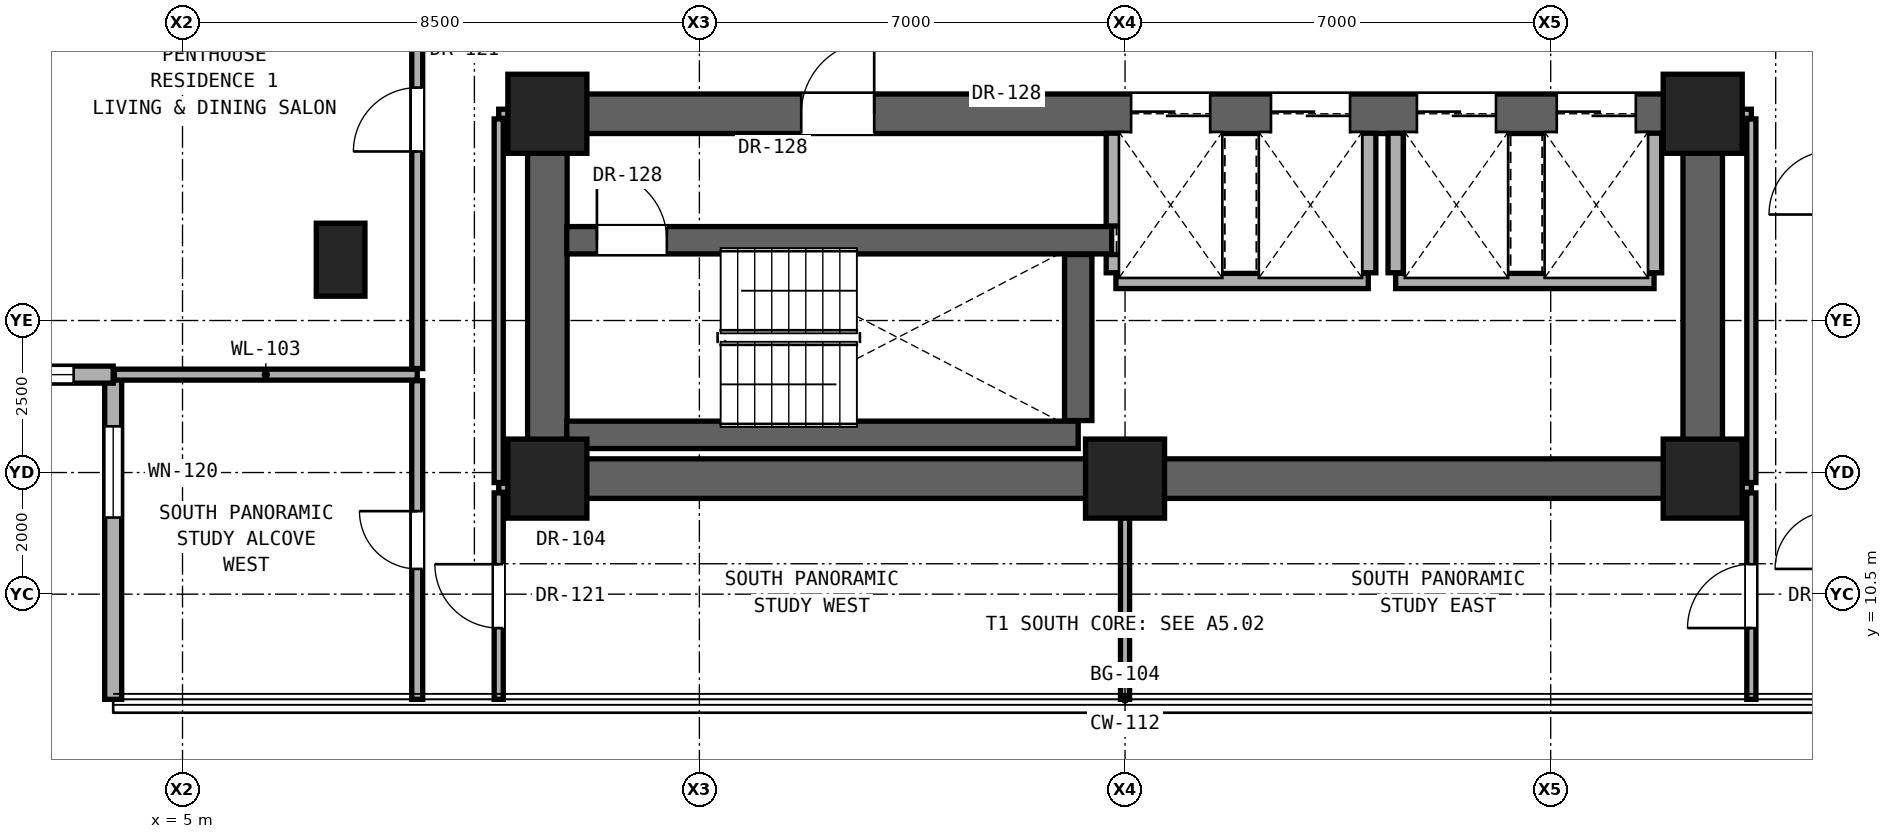
"""IFC4 building model, lengths in metres.
Left out: names, types, materials, properties, quantities, classifications, styles, units other than length and angle.
Written with IfcOpenShell. Run it as: python <this file> out.ifc"""

import sys

from ifc_helpers import new_model, si_unit, direction, frame, frame_2d, origin, origin_2d, place, context, subcontext, project, spatial, rectangle, extrude, element, fill, save


model = new_model("IFC4")
c1 = context("Model", 3, precision=1e-05, world=origin(), true_north=direction((0.0, 1.0)))
c2 = subcontext(c1, "Body", "Model", "MODEL_VIEW")
j1 = project(units=[si_unit("LENGTHUNIT", "METRE"), si_unit("PLANEANGLEUNIT", "RADIAN")], contexts=[c1])
p1 = place(None, origin())
s1 = spatial("IfcSite", under=j1, at=p1, CompositionType="ELEMENT")
p2 = place(p1, origin())
s2 = spatial("IfcBuilding", under=s1, at=p2, CompositionType="ELEMENT")
p3 = place(p2, frame((0.0, 0.0, 68.6)))
s3 = spatial("IfcBuildingStorey", under=s2, at=p3, CompositionType="ELEMENT", Elevation=68.6)
for number, where, z_axis, x_axis in (
    (1, (11.0, 12.4, 0.0), (0.0, 0.0, 1.0), (1.0, 0.0, 0.0)),
    (2, (20.5, 12.4, 0.0), (0.0, 0.0, 1.0), (1.0, 0.0, 0.0)),
    (3, (30.0, 12.4, 0.0), (0.0, 0.0, 1.0), (1.0, 0.0, 0.0)),
    (4, (11.0, 18.4, 0.0), (0.0, 0.0, 1.0), (1.0, 0.0, 0.0)),
    (5, (30.0, 18.4, 0.0), (0.0, 0.0, 1.0), (1.0, 0.0, 0.0)),
):
    element("IfcColumn", number, at=place(p3, frame(where, z_axis=z_axis, x_axis=x_axis)), inside=s3, PredefinedType="COLUMN", context=c2, shape_type="SweptSolid", body=[
        extrude(rectangle(XDim=1.3, YDim=1.3, at=origin_2d()), origin(), (0.0, 0.0, 1.0), 3.3),
    ])
p4 = place(p3, frame((7.6, 16.0, 0.0), z_axis=(0.0, 0.0, 1.0), x_axis=(1.0, 0.0, 0.0)))
e6 = element("IfcColumn", 6, at=p4, inside=s3, PredefinedType="PILASTER", context=c2, shape_type="SweptSolid", body=[
    extrude(rectangle(XDim=0.8, YDim=1.2, at=origin_2d()), origin(), (0.0, 0.0, 1.0), 3.3),
])
p5 = place(p3, frame((11.0, 12.4, 0.0), z_axis=(0.0, 0.0, 1.0), x_axis=(1.0, 0.0, 0.0)))
e7 = element("IfcWall", 7, at=p5, inside=s3, PredefinedType="SHEAR", context=c2, shape_type="SweptSolid", body=[
    extrude(rectangle(XDim=19.0, YDim=0.65, at=frame_2d((9.5, 0.0))), origin(), (0.0, 0.0, 1.0), 3.06),
])
for number, where, z_axis, x_axis in (
    (8, (11.0, 12.4, 0.0), (0.0, 0.0, 1.0), (0.0, 1.0, 0.0)),
    (9, (30.0, 12.4, 0.0), (0.0, 0.0, 1.0), (0.0, 1.0, 0.0)),
):
    element("IfcWall", number, at=place(p3, frame(where, z_axis=z_axis, x_axis=x_axis)), inside=s3, PredefinedType="SHEAR", context=c2, shape_type="SweptSolid", body=[
        extrude(rectangle(XDim=6.0, YDim=0.65, at=frame_2d((3.0, 0.0))), origin(), (0.0, 0.0, 1.0), 3.06),
    ])
p6 = place(p3, frame((11.0, 18.4, 0.0), z_axis=(0.0, 0.0, 1.0), x_axis=(1.0, 0.0, 0.0)))
e10 = element("IfcWall", 10, at=p6, inside=s3, PredefinedType="SHEAR", context=c2, shape_type="SweptSolid", body=[
    extrude(rectangle(XDim=19.0, YDim=0.65, at=frame_2d((9.5, 0.0))), origin(), (0.0, 0.0, 1.0), 3.06),
])
p7 = place(p6, frame((4.175, 0.0, 0.0)))
e11 = element("IfcOpeningElement", 11, at=p7, cuts=e10, PredefinedType="OPENING", context=c2, shape_type="SweptSolid", body=[
    extrude(rectangle(XDim=1.2, YDim=2.25, at=frame_2d((0.6, 1.125))), frame((0.0, 0.335, 0.0), z_axis=(0.0, -1.0, 0.0), x_axis=(1.0, 0.0, 0.0)), (0.0, 0.0, 1.0), 0.67),
])
p8 = place(p6, frame((9.6, 0.0, 0.0)))
e12 = element("IfcOpeningElement", 12, at=p8, cuts=e10, PredefinedType="OPENING", context=c2, shape_type="SweptSolid", body=[
    extrude(rectangle(XDim=1.3, YDim=2.3, at=frame_2d((0.65, 1.15))), frame((0.0, 0.335, 0.0), z_axis=(0.0, -1.0, 0.0), x_axis=(1.0, 0.0, 0.0)), (0.0, 0.0, 1.0), 0.67),
])
p9 = place(p6, frame((11.9, 0.0, 0.0)))
e13 = element("IfcOpeningElement", 13, at=p9, cuts=e10, PredefinedType="OPENING", context=c2, shape_type="SweptSolid", body=[
    extrude(rectangle(XDim=1.3, YDim=2.3, at=frame_2d((0.65, 1.15))), frame((0.0, 0.335, 0.0), z_axis=(0.0, -1.0, 0.0), x_axis=(1.0, 0.0, 0.0)), (0.0, 0.0, 1.0), 0.67),
])
p10 = place(p6, frame((14.3, 0.0, 0.0)))
e14 = element("IfcOpeningElement", 14, at=p10, cuts=e10, PredefinedType="OPENING", context=c2, shape_type="SweptSolid", body=[
    extrude(rectangle(XDim=1.3, YDim=2.3, at=frame_2d((0.65, 1.15))), frame((0.0, 0.335, 0.0), z_axis=(0.0, -1.0, 0.0), x_axis=(1.0, 0.0, 0.0)), (0.0, 0.0, 1.0), 0.67),
])
p11 = place(p6, frame((16.6, 0.0, 0.0)))
e15 = element("IfcOpeningElement", 15, at=p11, cuts=e10, PredefinedType="OPENING", context=c2, shape_type="SweptSolid", body=[
    extrude(rectangle(XDim=1.3, YDim=2.3, at=frame_2d((0.65, 1.15))), frame((0.0, 0.335, 0.0), z_axis=(0.0, -1.0, 0.0), x_axis=(1.0, 0.0, 0.0)), (0.0, 0.0, 1.0), 0.67),
])
p12 = place(p3, frame((3.86, 14.11, 0.0), z_axis=(0.0, 0.0, 1.0), x_axis=(0.0, -1.0, 0.0)))
e16 = element("IfcWall", 16, at=p12, inside=s3, PredefinedType="SOLIDWALL", context=c2, shape_type="SweptSolid", body=[
    extrude(rectangle(XDim=5.34, YDim=0.28, at=frame_2d((2.67, 0.0))), origin(), (0.0, 0.0, 1.0), 3.04),
])
p13 = place(p12, frame((0.85, 0.0, 0.79)))
e17 = element("IfcOpeningElement", 17, at=p13, cuts=e16, PredefinedType="OPENING", context=c2, shape_type="SweptSolid", body=[
    extrude(rectangle(XDim=1.5, YDim=2.1, at=frame_2d((0.75, 1.05))), frame((0.0, 0.15, 0.0), z_axis=(0.0, -1.0, 0.0), x_axis=(1.0, 0.0, 0.0)), (0.0, 0.0, 1.0), 0.3),
])
p14 = place(p3, frame((-1.48, 14.11, 0.0), z_axis=(0.0, 0.0, 1.0), x_axis=(1.0, 0.0, 0.0)))
e18 = element("IfcWall", 18, at=p14, inside=s3, PredefinedType="SOLIDWALL", context=c2, shape_type="SweptSolid", body=[
    extrude(rectangle(XDim=5.34, YDim=0.28, at=frame_2d((2.67, 0.0))), origin(), (0.0, 0.0, 1.0), 3.04),
])
p15 = place(p14, frame((3.59, 0.0, 0.85)))
e19 = element("IfcOpeningElement", 19, at=p15, cuts=e18, PredefinedType="OPENING", context=c2, shape_type="SweptSolid", body=[
    extrude(rectangle(XDim=1.1, YDim=2.0, at=frame_2d((0.55, 1.0))), frame((0.0, 0.15, 0.0), z_axis=(0.0, -1.0, 0.0), x_axis=(1.0, 0.0, 0.0)), (0.0, 0.0, 1.0), 0.3),
])
for number, where, z_axis, x_axis in (
    (20, (10.2, 12.25, 0.0), (0.0, 0.0, 1.0), (1.0, 0.0, 0.0)),
    (21, (30.32, 12.25, 0.0), (0.0, 0.0, 1.0), (1.0, 0.0, 0.0)),
):
    element("IfcWall", number, at=place(p3, frame(where, z_axis=z_axis, x_axis=x_axis)), inside=s3, PredefinedType="PARTITIONING", context=c2, shape_type="SweptSolid", body=[
        extrude(rectangle(XDim=0.48, YDim=0.15, at=frame_2d((0.24, 0.0))), origin(), (0.0, 0.0, 1.0), 3.06),
    ])
p16 = place(p3, frame((11.32, 13.12, 0.0), z_axis=(0.0, 0.0, 1.0), x_axis=(1.0, 0.0, 0.0)))
e22 = element("IfcWall", 22, at=p16, inside=s3, PredefinedType="SHEAR", context=c2, shape_type="SweptSolid", body=[
    extrude(rectangle(XDim=8.41, YDim=0.45, at=frame_2d((4.205, 0.0))), origin(), (0.0, 0.0, 1.0), 3.06),
])
p17 = place(p3, frame((3.88, 14.11, 0.0), z_axis=(0.0, 0.0, 1.0), x_axis=(1.0, 0.0, 0.0)))
e23 = element("IfcWall", 23, at=p17, inside=s3, PredefinedType="PARTITIONING", context=c2, shape_type="SweptSolid", body=[
    extrude(rectangle(XDim=4.98, YDim=0.18, at=frame_2d((2.49, 0.0))), origin(), (0.0, 0.0, 1.0), 3.06),
])
p18 = place(p3, frame((20.35, 15.65, 0.0), z_axis=(0.0, 0.0, 1.0), x_axis=(1.0, 0.0, 0.0)))
e24 = element("IfcWall", 24, at=p18, inside=s3, PredefinedType="SOLIDWALL", context=c2, shape_type="SweptSolid", body=[
    extrude(rectangle(XDim=4.15, YDim=0.25, at=frame_2d((2.075, 0.0))), origin(), (0.0, 0.0, 1.0), 3.06),
])
p19 = place(p3, frame((24.95, 15.65, 0.0), z_axis=(0.0, 0.0, 1.0), x_axis=(1.0, 0.0, 0.0)))
e25 = element("IfcWall", 25, at=p19, inside=s3, PredefinedType="SOLIDWALL", context=c2, shape_type="SweptSolid", body=[
    extrude(rectangle(XDim=4.25, YDim=0.25, at=frame_2d((2.125, 0.0))), origin(), (0.0, 0.0, 1.0), 3.06),
])
p20 = place(p3, frame((11.32, 16.32, 0.0), z_axis=(0.0, 0.0, 1.0), x_axis=(1.0, 0.0, 0.0)))
e26 = element("IfcWall", 26, at=p20, inside=s3, PredefinedType="SHEAR", context=c2, shape_type="SweptSolid", body=[
    extrude(rectangle(XDim=8.96, YDim=0.45, at=frame_2d((4.48, 0.0))), origin(), (0.0, 0.0, 1.0), 3.06),
])
p21 = place(p20, frame((0.495, 0.0, 0.0)))
e27 = element("IfcOpeningElement", 27, at=p21, cuts=e26, PredefinedType="OPENING", context=c2, shape_type="SweptSolid", body=[
    extrude(rectangle(XDim=1.15, YDim=2.2, at=frame_2d((0.575, 1.1))), frame((0.0, 0.235, 0.0), z_axis=(0.0, -1.0, 0.0), x_axis=(1.0, 0.0, 0.0)), (0.0, 0.0, 1.0), 0.47),
])
for number, where, z_axis, x_axis in (
    (28, (10.2, 18.4, 0.0), (0.0, 0.0, 1.0), (1.0, 0.0, 0.0)),
    (29, (30.32, 18.4, 0.0), (0.0, 0.0, 1.0), (1.0, 0.0, 0.0)),
):
    element("IfcWall", number, at=place(p3, frame(where, z_axis=z_axis, x_axis=x_axis)), inside=s3, PredefinedType="PARTITIONING", context=c2, shape_type="SweptSolid", body=[
        extrude(rectangle(XDim=0.48, YDim=0.15, at=frame_2d((0.24, 0.0))), origin(), (0.0, 0.0, 1.0), 2.436),
    ])
p22 = place(p3, frame((8.86, 8.77, 0.0), z_axis=(0.0, 0.0, 1.0), x_axis=(0.0, 1.0, 0.0)))
e30 = element("IfcWall", 30, at=p22, inside=s3, PredefinedType="PARTITIONING", context=c2, shape_type="SweptSolid", body=[
    extrude(rectangle(XDim=5.24, YDim=0.18, at=frame_2d((2.62, 0.0))), origin(), (0.0, 0.0, 1.0), 3.06),
])
p23 = place(p22, frame((2.145, 0.0, 0.0)))
e31 = element("IfcOpeningElement", 31, at=p23, cuts=e30, PredefinedType="OPENING", context=c2, shape_type="SweptSolid", body=[
    extrude(rectangle(XDim=0.95, YDim=2.15, at=frame_2d((0.475, 1.075))), frame((0.0, 0.1, 0.0), z_axis=(0.0, -1.0, 0.0), x_axis=(1.0, 0.0, 0.0)), (0.0, 0.0, 1.0), 0.2),
])
p24 = place(p3, frame((8.86, 14.21, 0.0), z_axis=(0.0, 0.0, 1.0), x_axis=(0.0, 1.0, 0.0)))
e32 = element("IfcWall", 32, at=p24, inside=s3, PredefinedType="PARTITIONING", context=c2, shape_type="SweptSolid", body=[
    extrude(rectangle(XDim=8.19, YDim=0.18, at=frame_2d((4.095, 0.0))), origin(), (0.0, 0.0, 1.0), 2.436),
])
p25 = place(p24, frame((3.57, 0.0, 0.0)))
e33 = element("IfcOpeningElement", 33, at=p25, cuts=e32, PredefinedType="OPENING", context=c2, shape_type="SweptSolid", body=[
    extrude(rectangle(XDim=1.05, YDim=2.2, at=frame_2d((0.525, 1.1))), frame((0.0, 0.1, 0.0), z_axis=(0.0, -1.0, 0.0), x_axis=(1.0, 0.0, 0.0)), (0.0, 0.0, 1.0), 0.2),
])
p26 = place(p3, frame((10.2, 8.77, 0.0), z_axis=(0.0, 0.0, 1.0), x_axis=(0.0, 1.0, 0.0)))
e34 = element("IfcWall", 34, at=p26, inside=s3, PredefinedType="PARTITIONING", context=c2, shape_type="SweptSolid", body=[
    extrude(rectangle(XDim=3.395, YDim=0.15, at=frame_2d((1.698, 0.0))), origin(), (0.0, 0.0, 1.0), 3.06),
])
p27 = place(p26, frame((1.173, 0.0, 0.0)))
e35 = element("IfcOpeningElement", 35, at=p27, cuts=e34, PredefinedType="OPENING", context=c2, shape_type="SweptSolid", body=[
    extrude(rectangle(XDim=1.05, YDim=2.2, at=frame_2d((0.525, 1.1))), frame((0.0, 0.085, 0.0), z_axis=(0.0, -1.0, 0.0), x_axis=(1.0, 0.0, 0.0)), (0.0, 0.0, 1.0), 0.17),
])
p28 = place(p3, frame((10.2, 12.335, 0.0), z_axis=(0.0, 0.0, 1.0), x_axis=(0.0, 1.0, 0.0)))
e36 = element("IfcWall", 36, at=p28, inside=s3, PredefinedType="PARTITIONING", context=c2, shape_type="SweptSolid", body=[
    extrude(rectangle(XDim=5.98, YDim=0.15, at=frame_2d((2.99, 0.0))), origin(), (0.0, 0.0, 1.0), 2.436),
])
p29 = place(p3, frame((19.73, 13.355, 0.0), z_axis=(0.0, 0.0, 1.0), x_axis=(0.0, 1.0, 0.0)))
e37 = element("IfcWall", 37, at=p29, inside=s3, PredefinedType="SHEAR", context=c2, shape_type="SweptSolid", body=[
    extrude(rectangle(XDim=2.73, YDim=0.45, at=frame_2d((1.365, 0.0))), origin(), (0.0, 0.0, 1.0), 3.06),
])
p30 = place(p3, frame((20.315, 15.785, 0.0), z_axis=(0.0, 0.0, 1.0), x_axis=(0.0, 1.0, 0.0)))
e38 = element("IfcWall", 38, at=p30, inside=s3, PredefinedType="SOLIDWALL", context=c2, shape_type="SweptSolid", body=[
    extrude(rectangle(XDim=0.3, YDim=0.25, at=frame_2d((0.15, 0.0))), origin(), (0.0, 0.0, 1.0), 3.06),
])
p31 = place(p3, frame((20.315, 16.555, 0.0), z_axis=(0.0, 0.0, 1.0), x_axis=(0.0, 1.0, 0.0)))
e39 = element("IfcWall", 39, at=p31, inside=s3, PredefinedType="SOLIDWALL", context=c2, shape_type="SweptSolid", body=[
    extrude(rectangle(XDim=1.525, YDim=0.25, at=frame_2d((0.763, 0.0))), origin(), (0.0, 0.0, 1.0), 3.06),
])
p32 = place(p3, frame((20.5, 8.77, 0.0), z_axis=(0.0, 0.0, 1.0), x_axis=(0.0, 1.0, 0.0)))
e40 = element("IfcWall", 40, at=p32, inside=s3, PredefinedType="PARTITIONING", context=c2, shape_type="SweptSolid", body=[
    extrude(rectangle(XDim=3.31, YDim=0.15, at=frame_2d((1.655, 0.0))), origin(), (0.0, 0.0, 1.0), 3.06),
])
for number, where, z_axis, x_axis in (
    (41, (24.5, 15.785, 0.0), (0.0, 0.0, 1.0), (0.0, 1.0, 0.0)),
    (42, (24.95, 15.785, 0.0), (0.0, 0.0, 1.0), (0.0, 1.0, 0.0)),
    (43, (29.2, 15.785, 0.0), (0.0, 0.0, 1.0), (0.0, 1.0, 0.0)),
):
    element("IfcWall", number, at=place(p3, frame(where, z_axis=z_axis, x_axis=x_axis)), inside=s3, PredefinedType="SOLIDWALL", context=c2, shape_type="SweptSolid", body=[
        extrude(rectangle(XDim=2.295, YDim=0.25, at=frame_2d((1.147, 0.0))), origin(), (0.0, 0.0, 1.0), 3.06),
    ])
p33 = place(p3, frame((30.8, 8.77, 0.0), z_axis=(0.0, 0.0, 1.0), x_axis=(0.0, 1.0, 0.0)))
e44 = element("IfcWall", 44, at=p33, inside=s3, PredefinedType="PARTITIONING", context=c2, shape_type="SweptSolid", body=[
    extrude(rectangle(XDim=3.395, YDim=0.15, at=frame_2d((1.698, 0.0))), origin(), (0.0, 0.0, 1.0), 3.06),
])
p34 = place(p33, frame((1.173, 0.0, 0.0)))
e45 = element("IfcOpeningElement", 45, at=p34, cuts=e44, PredefinedType="OPENING", context=c2, shape_type="SweptSolid", body=[
    extrude(rectangle(XDim=1.05, YDim=2.2, at=frame_2d((0.525, 1.1))), frame((0.0, 0.085, 0.0), z_axis=(0.0, -1.0, 0.0), x_axis=(1.0, 0.0, 0.0)), (0.0, 0.0, 1.0), 0.17),
])
p35 = place(p3, frame((30.8, 12.335, 0.0), z_axis=(0.0, 0.0, 1.0), x_axis=(0.0, 1.0, 0.0)))
e46 = element("IfcWall", 46, at=p35, inside=s3, PredefinedType="PARTITIONING", context=c2, shape_type="SweptSolid", body=[
    extrude(rectangle(XDim=5.98, YDim=0.15, at=frame_2d((2.99, 0.0))), origin(), (0.0, 0.0, 1.0), 2.436),
])
p36 = place(p13, origin())
e47 = element("IfcWindow", 47, at=p36, inside=s3, PartitioningType="SINGLE_PANEL", PredefinedType="WINDOW", context=c2, shape_type="SweptSolid", body=[
    extrude(rectangle(XDim=1.5, YDim=2.1, at=frame_2d((0.75, 1.05))), frame((0.0, 0.03, 0.0), z_axis=(0.0, -1.0, 0.0), x_axis=(1.0, 0.0, 0.0)), (0.0, 0.0, 1.0), 0.06),
])
fill(e17, e47)
p37 = place(p15, origin())
e48 = element("IfcWindow", 48, at=p37, inside=s3, PartitioningType="SINGLE_PANEL", PredefinedType="WINDOW", context=c2, shape_type="SweptSolid", body=[
    extrude(rectangle(XDim=1.1, YDim=2.0, at=frame_2d((0.55, 1.0))), frame((0.0, 0.03, 0.0), z_axis=(0.0, -1.0, 0.0), x_axis=(1.0, 0.0, 0.0)), (0.0, 0.0, 1.0), 0.06),
])
fill(e19, e48)
p38 = place(p7, origin())
e49 = element("IfcDoor", 49, at=p38, inside=s3, OperationType="SINGLE_SWING_RIGHT", PredefinedType="DOOR", context=c2, shape_type="SweptSolid", body=[
    extrude(rectangle(XDim=1.2, YDim=2.25, at=frame_2d((0.6, 1.125))), frame((0.0, 0.025, 0.0), z_axis=(0.0, -1.0, 0.0), x_axis=(1.0, 0.0, 0.0)), (0.0, 0.0, 1.0), 0.05),
])
fill(e11, e49)
p39 = place(p21, origin())
e50 = element("IfcDoor", 50, at=p39, inside=s3, OperationType="SINGLE_SWING_LEFT", PredefinedType="DOOR", context=c2, shape_type="SweptSolid", body=[
    extrude(rectangle(XDim=1.15, YDim=2.2, at=frame_2d((0.575, 1.1))), frame((0.0, 0.025, 0.0), z_axis=(0.0, -1.0, 0.0), x_axis=(1.0, 0.0, 0.0)), (0.0, 0.0, 1.0), 0.05),
])
fill(e27, e50)
p40 = place(p25, origin())
e51 = element("IfcDoor", 51, at=p40, inside=s3, OperationType="SINGLE_SWING_LEFT", PredefinedType="DOOR", context=c2, shape_type="SweptSolid", body=[
    extrude(rectangle(XDim=1.05, YDim=2.2, at=frame_2d((0.525, 1.1))), frame((0.0, 0.025, 0.0), z_axis=(0.0, -1.0, 0.0), x_axis=(1.0, 0.0, 0.0)), (0.0, 0.0, 1.0), 0.05),
])
fill(e33, e51)
p41 = place(p27, origin())
e52 = element("IfcDoor", 52, at=p41, inside=s3, OperationType="SINGLE_SWING_RIGHT", PredefinedType="DOOR", context=c2, shape_type="SweptSolid", body=[
    extrude(rectangle(XDim=1.05, YDim=2.2, at=frame_2d((0.525, 1.1))), frame((0.0, 0.025, 0.0), z_axis=(0.0, -1.0, 0.0), x_axis=(1.0, 0.0, 0.0)), (0.0, 0.0, 1.0), 0.05),
])
fill(e35, e52)
p42 = place(p34, origin())
e53 = element("IfcDoor", 53, at=p42, inside=s3, OperationType="SINGLE_SWING_LEFT", PredefinedType="DOOR", context=c2, shape_type="SweptSolid", body=[
    extrude(rectangle(XDim=1.05, YDim=2.2, at=frame_2d((0.525, 1.1))), frame((0.0, 0.025, 0.0), z_axis=(0.0, -1.0, 0.0), x_axis=(1.0, 0.0, 0.0)), (0.0, 0.0, 1.0), 0.05),
])
fill(e45, e53)
p43 = place(p23, origin())
e54 = element("IfcDoor", 54, at=p43, inside=s3, OperationType="SINGLE_SWING_RIGHT", PredefinedType="DOOR", context=c2, shape_type="SweptSolid", body=[
    extrude(rectangle(XDim=0.95, YDim=2.15, at=frame_2d((0.475, 1.075))), frame((0.0, 0.025, 0.0), z_axis=(0.0, -1.0, 0.0), x_axis=(1.0, 0.0, 0.0)), (0.0, 0.0, 1.0), 0.05),
])
fill(e31, e54)
p44 = place(p8, origin())
e55 = element("IfcDoor", 55, at=p44, inside=s3, OperationType="DOUBLE_DOOR_SLIDING", PredefinedType="DOOR", context=c2, shape_type="SweptSolid", body=[
    extrude(rectangle(XDim=1.3, YDim=2.3, at=frame_2d((0.65, 1.15))), frame((0.0, 0.025, 0.0), z_axis=(0.0, -1.0, 0.0), x_axis=(1.0, 0.0, 0.0)), (0.0, 0.0, 1.0), 0.05),
])
fill(e12, e55)
p45 = place(p9, origin())
e56 = element("IfcDoor", 56, at=p45, inside=s3, OperationType="DOUBLE_DOOR_SLIDING", PredefinedType="DOOR", context=c2, shape_type="SweptSolid", body=[
    extrude(rectangle(XDim=1.3, YDim=2.3, at=frame_2d((0.65, 1.15))), frame((0.0, 0.025, 0.0), z_axis=(0.0, -1.0, 0.0), x_axis=(1.0, 0.0, 0.0)), (0.0, 0.0, 1.0), 0.05),
])
fill(e13, e56)
p46 = place(p10, origin())
e57 = element("IfcDoor", 57, at=p46, inside=s3, OperationType="DOUBLE_DOOR_SLIDING", PredefinedType="DOOR", context=c2, shape_type="SweptSolid", body=[
    extrude(rectangle(XDim=1.3, YDim=2.3, at=frame_2d((0.65, 1.15))), frame((0.0, 0.025, 0.0), z_axis=(0.0, -1.0, 0.0), x_axis=(1.0, 0.0, 0.0)), (0.0, 0.0, 1.0), 0.05),
])
fill(e14, e57)
p47 = place(p11, origin())
e58 = element("IfcDoor", 58, at=p47, inside=s3, OperationType="DOUBLE_DOOR_SLIDING", PredefinedType="DOOR", context=c2, shape_type="SweptSolid", body=[
    extrude(rectangle(XDim=1.3, YDim=2.3, at=frame_2d((0.65, 1.15))), frame((0.0, 0.025, 0.0), z_axis=(0.0, -1.0, 0.0), x_axis=(1.0, 0.0, 0.0)), (0.0, 0.0, 1.0), 0.05),
])
fill(e15, e58)
save(model, sys.argv[1])
